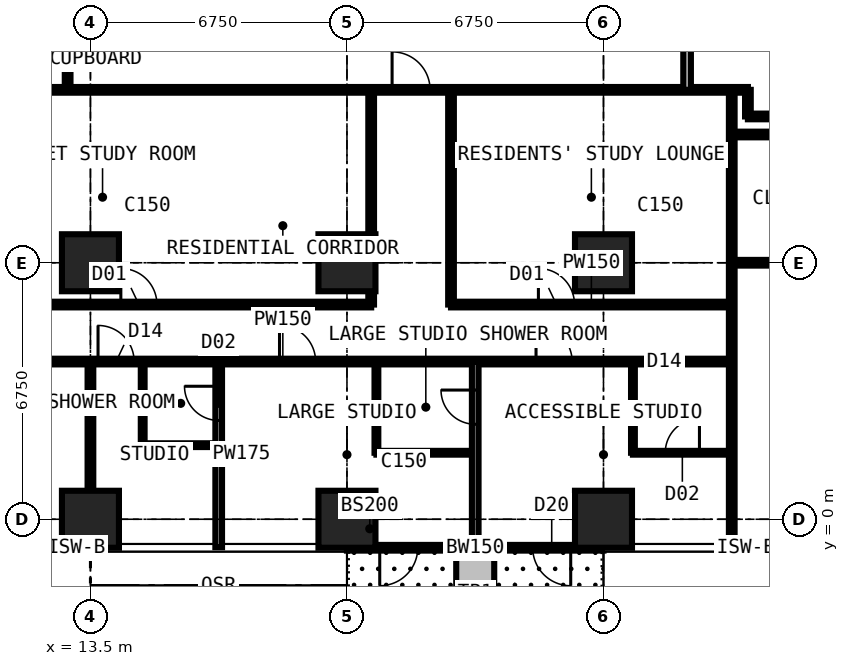
"""IFC4 building model, lengths in metres.
Left out: names, types, materials, properties, quantities, classifications, styles, units other than length and angle.
Written with IfcOpenShell. Run it as: python <this file> out.ifc"""

import sys

from ifc_helpers import new_model, si_unit, direction, frame, frame_2d, origin, origin_2d, place, context, subcontext, project, spatial, rectangle, extrude, element, fill, save


model = new_model("IFC4")
c1 = context("Model", 3, precision=1e-05, world=origin(), true_north=direction((0.0, 1.0)))
c2 = subcontext(c1, "Body", "Model", "MODEL_VIEW")
j1 = project(units=[si_unit("LENGTHUNIT", "METRE"), si_unit("PLANEANGLEUNIT", "RADIAN")], contexts=[c1])
p1 = place(None, origin())
s1 = spatial("IfcSite", under=j1, at=p1, CompositionType="ELEMENT")
p2 = place(p1, origin())
s2 = spatial("IfcBuilding", under=s1, at=p2, CompositionType="ELEMENT")
p3 = place(p2, frame((0.0, 0.0, 126.9)))
s3 = spatial("IfcBuildingStorey", under=s2, at=p3, CompositionType="ELEMENT", Elevation=126.9)
for number, where, z_axis, x_axis in (
    (1, (13.5, 0.0, 0.0), (0.0, 0.0, 1.0), (1.0, 0.0, 0.0)),
    (2, (13.5, 6.75, 0.0), (0.0, 0.0, 1.0), (1.0, 0.0, 0.0)),
    (3, (20.25, 0.0, 0.0), (0.0, 0.0, 1.0), (1.0, 0.0, 0.0)),
    (4, (20.25, 6.75, 0.0), (0.0, 0.0, 1.0), (1.0, 0.0, 0.0)),
    (5, (27.0, 0.0, 0.0), (0.0, 0.0, 1.0), (1.0, 0.0, 0.0)),
    (6, (27.0, 6.75, 0.0), (0.0, 0.0, 1.0), (1.0, 0.0, 0.0)),
):
    element("IfcColumn", number, at=place(p3, frame(where, z_axis=z_axis, x_axis=x_axis)), inside=s3, PredefinedType="COLUMN", context=c2, shape_type="SweptSolid", body=[
        extrude(rectangle(XDim=1.5, YDim=1.5, at=origin_2d()), origin(), (0.0, 0.0, 1.0), 3.6),
    ])
p4 = place(p3, frame((27.0, -0.75, 0.0), z_axis=(0.0, 0.0, 1.0), x_axis=(-1.0, 0.0, 0.0)))
e7 = element("IfcWall", 7, at=p4, inside=s3, PredefinedType="SOLIDWALL", context=c2, shape_type="SweptSolid", body=[
    extrude(rectangle(XDim=6.75, YDim=0.15, at=frame_2d((3.375, 0.0))), origin(), (0.0, 0.0, 1.0), 3.375),
])
p5 = place(p4, frame((0.863, 0.0, 0.0)))
e8 = element("IfcOpeningElement", 8, at=p5, cuts=e7, PredefinedType="OPENING", context=c2, shape_type="SweptSolid", body=[
    extrude(rectangle(XDim=1.0, YDim=2.2, at=frame_2d((0.5, 1.1))), frame((0.0, 0.085, 0.0), z_axis=(0.0, -1.0, 0.0), x_axis=(1.0, 0.0, 0.0)), (0.0, 0.0, 1.0), 0.17),
])
p6 = place(p4, frame((1.975, 0.0, 0.9)))
e9 = element("IfcOpeningElement", 9, at=p6, cuts=e7, PredefinedType="OPENING", context=c2, shape_type="SweptSolid", body=[
    extrude(rectangle(XDim=1.2, YDim=1.8, at=frame_2d((0.6, 0.9))), frame((0.0, 0.085, 0.0), z_axis=(0.0, -1.0, 0.0), x_axis=(1.0, 0.0, 0.0)), (0.0, 0.0, 1.0), 0.17),
])
p7 = place(p4, frame((4.887, 0.0, 0.0)))
e10 = element("IfcOpeningElement", 10, at=p7, cuts=e7, PredefinedType="OPENING", context=c2, shape_type="SweptSolid", body=[
    extrude(rectangle(XDim=1.0, YDim=2.2, at=frame_2d((0.5, 1.1))), frame((0.0, 0.085, 0.0), z_axis=(0.0, -1.0, 0.0), x_axis=(1.0, 0.0, 0.0)), (0.0, 0.0, 1.0), 0.17),
])
p8 = place(p4, frame((3.575, 0.0, 0.9)))
e11 = element("IfcOpeningElement", 11, at=p8, cuts=e7, PredefinedType="OPENING", context=c2, shape_type="SweptSolid", body=[
    extrude(rectangle(XDim=1.2, YDim=1.8, at=frame_2d((0.6, 0.9))), frame((0.0, 0.085, 0.0), z_axis=(0.0, -1.0, 0.0), x_axis=(1.0, 0.0, 0.0)), (0.0, 0.0, 1.0), 0.17),
])
p9 = place(p3, frame((23.625, -0.85, 0.0), z_axis=(0.0, 0.0, 1.0), x_axis=(0.0, -1.0, 0.0)))
e12 = element("IfcWall", 12, at=p9, inside=s3, PredefinedType="USERDEFINED", context=c2, shape_type="SweptSolid", body=[
    extrude(rectangle(XDim=2.2, YDim=1.0, at=frame_2d((1.1, 0.0))), origin(), (0.0, 0.0, 1.0), 0.9),
])
p10 = place(p3, frame((6.75, 4.15, 0.0), z_axis=(0.0, 0.0, 1.0), x_axis=(1.0, 0.0, 0.0)))
e13 = element("IfcWall", 13, at=p10, inside=s3, PredefinedType="PARTITIONING", context=c2, shape_type="SweptSolid", body=[
    extrude(rectangle(XDim=23.625, YDim=0.15, at=frame_2d((11.812, 0.0))), origin(), (0.0, 0.0, 1.0), 3.375),
])
p11 = place(p10, frame((2.85, 0.0, 0.0)))
e14 = element("IfcOpeningElement", 14, at=p11, cuts=e13, PredefinedType="OPENING", context=c2, shape_type="SweptSolid", body=[
    extrude(rectangle(XDim=1.0, YDim=2.2, at=frame_2d((0.5, 1.1))), frame((0.0, 0.085, 0.0), z_axis=(0.0, -1.0, 0.0), x_axis=(1.0, 0.0, 0.0)), (0.0, 0.0, 1.0), 0.17),
])
p12 = place(p10, frame((18.475, 0.0, 0.0)))
e15 = element("IfcOpeningElement", 15, at=p12, cuts=e13, PredefinedType="OPENING", context=c2, shape_type="SweptSolid", body=[
    extrude(rectangle(XDim=0.95, YDim=2.2, at=frame_2d((0.475, 1.1))), frame((0.0, 0.085, 0.0), z_axis=(0.0, -1.0, 0.0), x_axis=(1.0, 0.0, 0.0)), (0.0, 0.0, 1.0), 0.17),
])
p13 = place(p10, frame((11.725, 0.0, 0.0)))
e16 = element("IfcOpeningElement", 16, at=p13, cuts=e13, PredefinedType="OPENING", context=c2, shape_type="SweptSolid", body=[
    extrude(rectangle(XDim=0.95, YDim=2.2, at=frame_2d((0.475, 1.1))), frame((0.0, 0.085, 0.0), z_axis=(0.0, -1.0, 0.0), x_axis=(1.0, 0.0, 0.0)), (0.0, 0.0, 1.0), 0.17),
])
p14 = place(p10, frame((6.95, 0.0, 0.0)))
e17 = element("IfcOpeningElement", 17, at=p14, cuts=e13, PredefinedType="OPENING", context=c2, shape_type="SweptSolid", body=[
    extrude(rectangle(XDim=0.95, YDim=2.2, at=frame_2d((0.475, 1.1))), frame((0.0, 0.085, 0.0), z_axis=(0.0, -1.0, 0.0), x_axis=(1.0, 0.0, 0.0)), (0.0, 0.0, 1.0), 0.17),
])
p15 = place(p3, frame((6.75, 5.65, 0.0), z_axis=(0.0, 0.0, 1.0), x_axis=(1.0, 0.0, 0.0)))
e18 = element("IfcWall", 18, at=p15, inside=s3, PredefinedType="PARTITIONING", context=c2, shape_type="SweptSolid", body=[
    extrude(rectangle(XDim=14.137, YDim=0.15, at=frame_2d((7.069, 0.0))), origin(), (0.0, 0.0, 1.0), 3.375),
])
p16 = place(p15, frame((7.55, 0.0, 0.0)))
e19 = element("IfcOpeningElement", 19, at=p16, cuts=e18, PredefinedType="OPENING", context=c2, shape_type="SweptSolid", body=[
    extrude(rectangle(XDim=0.95, YDim=2.2, at=frame_2d((0.475, 1.1))), frame((0.0, 0.085, 0.0), z_axis=(0.0, -1.0, 0.0), x_axis=(1.0, 0.0, 0.0)), (0.0, 0.0, 1.0), 0.17),
])
p17 = place(p3, frame((10.125, 11.3, 0.0), z_axis=(0.0, 0.0, 1.0), x_axis=(1.0, 0.0, 0.0)))
e20 = element("IfcWall", 20, at=p17, inside=s3, PredefinedType="PARTITIONING", context=c2, shape_type="SweptSolid", body=[
    extrude(rectangle(XDim=20.675, YDim=0.15, at=frame_2d((10.337, 0.0))), origin(), (0.0, 0.0, 1.0), 3.375),
])
p18 = place(p17, frame((11.312, 0.0, 0.0)))
e21 = element("IfcOpeningElement", 21, at=p18, cuts=e20, PredefinedType="OPENING", context=c2, shape_type="SweptSolid", body=[
    extrude(rectangle(XDim=1.0, YDim=2.2, at=frame_2d((0.5, 1.1))), frame((0.0, 0.085, 0.0), z_axis=(0.0, -1.0, 0.0), x_axis=(1.0, 0.0, 0.0)), (0.0, 0.0, 1.0), 0.17),
])
p19 = place(p3, frame((12.9, 11.3, 0.0), z_axis=(0.0, 0.0, 1.0), x_axis=(0.0, 1.0, 0.0)))
e22 = element("IfcWall", 22, at=p19, inside=s3, PredefinedType="PARTITIONING", context=c2, shape_type="SweptSolid", body=[
    extrude(rectangle(XDim=1.6, YDim=0.15, at=frame_2d((0.8, 0.0))), origin(), (0.0, 0.0, 1.0), 3.375),
])
p20 = place(p3, frame((13.5, -0.734, 0.0), z_axis=(0.0, 0.0, 1.0), x_axis=(0.0, 1.0, 0.0)))
e23 = element("IfcWall", 23, at=p20, inside=s3, PredefinedType="PARTITIONING", context=c2, shape_type="SweptSolid", body=[
    extrude(rectangle(XDim=4.884, YDim=0.15, at=frame_2d((2.442, 0.0))), origin(), (0.0, 0.0, 1.0), 2.61),
])
p21 = place(p3, frame((14.875, 1.95, 0.0), z_axis=(0.0, 0.0, 1.0), x_axis=(0.0, 1.0, 0.0)))
e24 = element("IfcWall", 24, at=p21, inside=s3, PredefinedType="PARTITIONING", context=c2, shape_type="SweptSolid", body=[
    extrude(rectangle(XDim=2.2, YDim=0.1, at=frame_2d((1.1, 0.0))), origin(), (0.0, 0.0, 1.0), 3.375),
])
p22 = place(p3, frame((14.875, 1.95, 0.0), z_axis=(0.0, 0.0, 1.0), x_axis=(1.0, 0.0, 0.0)))
e25 = element("IfcWall", 25, at=p22, inside=s3, PredefinedType="PARTITIONING", context=c2, shape_type="SweptSolid", body=[
    extrude(rectangle(XDim=2.0, YDim=0.1, at=frame_2d((1.0, 0.0))), origin(), (0.0, 0.0, 1.0), 3.375),
])
p23 = place(p3, frame((16.875, -0.734, 0.0), z_axis=(0.0, 0.0, 1.0), x_axis=(0.0, 1.0, 0.0)))
e26 = element("IfcWall", 26, at=p23, inside=s3, PredefinedType="PARTITIONING", context=c2, shape_type="SweptSolid", body=[
    extrude(rectangle(XDim=4.884, YDim=0.175, at=frame_2d((2.442, 0.0))), origin(), (0.0, 0.0, 1.0), 3.375),
])
p24 = place(p23, frame((3.334, 0.0, 0.0)))
e27 = element("IfcOpeningElement", 27, at=p24, cuts=e26, PredefinedType="OPENING", context=c2, shape_type="SweptSolid", body=[
    extrude(rectangle(XDim=0.9, YDim=2.2, at=frame_2d((0.45, 1.1))), frame((0.0, 0.097, 0.0), z_axis=(0.0, -1.0, 0.0), x_axis=(1.0, 0.0, 0.0)), (0.0, 0.0, 1.0), 0.195),
])
p25 = place(p3, frame((20.887, 5.65, 0.0), z_axis=(0.0, 0.0, 1.0), x_axis=(0.0, 1.0, 0.0)))
e28 = element("IfcWall", 28, at=p25, inside=s3, PredefinedType="PARTITIONING", context=c2, shape_type="SweptSolid", body=[
    extrude(rectangle(XDim=5.65, YDim=0.15, at=frame_2d((2.825, 0.0))), origin(), (0.0, 0.0, 1.0), 3.375),
])
p26 = place(p3, frame((21.025, 1.75, 0.0), z_axis=(0.0, 0.0, 1.0), x_axis=(0.0, 1.0, 0.0)))
e29 = element("IfcWall", 29, at=p26, inside=s3, PredefinedType="PARTITIONING", context=c2, shape_type="SweptSolid", body=[
    extrude(rectangle(XDim=2.4, YDim=0.1, at=frame_2d((1.2, 0.0))), origin(), (0.0, 0.0, 1.0), 3.375),
])
p27 = place(p3, frame((21.025, 1.75, 0.0), z_axis=(0.0, 0.0, 1.0), x_axis=(1.0, 0.0, 0.0)))
e30 = element("IfcWall", 30, at=p27, inside=s3, PredefinedType="PARTITIONING", context=c2, shape_type="SweptSolid", body=[
    extrude(rectangle(XDim=2.6, YDim=0.1, at=frame_2d((1.3, 0.0))), origin(), (0.0, 0.0, 1.0), 3.375),
])
p28 = place(p3, frame((22.988, 5.65, 0.0), z_axis=(0.0, 0.0, 1.0), x_axis=(1.0, 0.0, 0.0)))
e31 = element("IfcWall", 31, at=p28, inside=s3, PredefinedType="PARTITIONING", context=c2, shape_type="SweptSolid", body=[
    extrude(rectangle(XDim=7.387, YDim=0.15, at=frame_2d((3.694, 0.0))), origin(), (0.0, 0.0, 1.0), 3.375),
])
p29 = place(p28, frame((2.3, 0.0, 0.0)))
e32 = element("IfcOpeningElement", 32, at=p29, cuts=e31, PredefinedType="OPENING", context=c2, shape_type="SweptSolid", body=[
    extrude(rectangle(XDim=0.95, YDim=2.2, at=frame_2d((0.475, 1.1))), frame((0.0, 0.085, 0.0), z_axis=(0.0, -1.0, 0.0), x_axis=(1.0, 0.0, 0.0)), (0.0, 0.0, 1.0), 0.17),
])
p30 = place(p3, frame((22.988, 5.65, 0.0), z_axis=(0.0, 0.0, 1.0), x_axis=(0.0, 1.0, 0.0)))
e33 = element("IfcWall", 33, at=p30, inside=s3, PredefinedType="PARTITIONING", context=c2, shape_type="SweptSolid", body=[
    extrude(rectangle(XDim=5.65, YDim=0.15, at=frame_2d((2.825, 0.0))), origin(), (0.0, 0.0, 1.0), 3.375),
])
p31 = place(p3, frame((23.625, -0.734, 0.0), z_axis=(0.0, 0.0, 1.0), x_axis=(0.0, 1.0, 0.0)))
e34 = element("IfcWall", 34, at=p31, inside=s3, PredefinedType="PARTITIONING", context=c2, shape_type="SweptSolid", body=[
    extrude(rectangle(XDim=4.884, YDim=0.175, at=frame_2d((2.442, 0.0))), origin(), (0.0, 0.0, 1.0), 3.375),
])
p32 = place(p31, frame((3.234, 0.0, 0.0)))
e35 = element("IfcOpeningElement", 35, at=p32, cuts=e34, PredefinedType="OPENING", context=c2, shape_type="SweptSolid", body=[
    extrude(rectangle(XDim=0.9, YDim=2.2, at=frame_2d((0.45, 1.1))), frame((0.0, 0.097, 0.0), z_axis=(0.0, -1.0, 0.0), x_axis=(1.0, 0.0, 0.0)), (0.0, 0.0, 1.0), 0.195),
])
p33 = place(p3, frame((27.775, 1.75, 0.0), z_axis=(0.0, 0.0, 1.0), x_axis=(0.0, 1.0, 0.0)))
e36 = element("IfcWall", 36, at=p33, inside=s3, PredefinedType="PARTITIONING", context=c2, shape_type="SweptSolid", body=[
    extrude(rectangle(XDim=2.4, YDim=0.1, at=frame_2d((1.2, 0.0))), origin(), (0.0, 0.0, 1.0), 3.375),
])
p34 = place(p3, frame((27.775, 1.75, 0.0), z_axis=(0.0, 0.0, 1.0), x_axis=(1.0, 0.0, 0.0)))
e37 = element("IfcWall", 37, at=p34, inside=s3, PredefinedType="PARTITIONING", context=c2, shape_type="SweptSolid", body=[
    extrude(rectangle(XDim=2.6, YDim=0.1, at=frame_2d((1.3, 0.0))), origin(), (0.0, 0.0, 1.0), 3.375),
])
p35 = place(p34, frame((0.85, 0.0, 0.0)))
e38 = element("IfcOpeningElement", 38, at=p35, cuts=e37, PredefinedType="OPENING", context=c2, shape_type="SweptSolid", body=[
    extrude(rectangle(XDim=0.9, YDim=2.2, at=frame_2d((0.45, 1.1))), frame((0.0, 0.06, 0.0), z_axis=(0.0, -1.0, 0.0), x_axis=(1.0, 0.0, 0.0)), (0.0, 0.0, 1.0), 0.12),
])
p36 = place(p3, frame((29.2, 11.3, 0.0), z_axis=(0.0, 0.0, 1.0), x_axis=(0.0, 1.0, 0.0)))
e39 = element("IfcWall", 39, at=p36, inside=s3, PredefinedType="PARTITIONING", context=c2, shape_type="SweptSolid", body=[
    extrude(rectangle(XDim=17.9, YDim=0.2, at=frame_2d((8.95, 0.0))), origin(), (0.0, 0.0, 1.0), 3.375),
])
p37 = place(p36, frame((8.35, 0.0, 0.0)))
e40 = element("IfcOpeningElement", 40, at=p37, cuts=e39, PredefinedType="OPENING", context=c2, shape_type="SweptSolid", body=[
    extrude(rectangle(XDim=1.2, YDim=2.2, at=frame_2d((0.6, 1.1))), frame((0.0, 0.11, 0.0), z_axis=(0.0, -1.0, 0.0), x_axis=(1.0, 0.0, 0.0)), (0.0, 0.0, 1.0), 0.22),
])
p38 = place(p3, frame((30.375, -0.734, 0.0), z_axis=(0.0, 0.0, 1.0), x_axis=(0.0, 1.0, 0.0)))
e41 = element("IfcWall", 41, at=p38, inside=s3, PredefinedType="PARTITIONING", context=c2, shape_type="SweptSolid", body=[
    extrude(rectangle(XDim=12.034, YDim=0.15, at=frame_2d((6.017, 0.0))), origin(), (0.0, 0.0, 1.0), 3.375),
])
p39 = place(p3, frame((30.375, 6.75, 0.0), z_axis=(0.0, 0.0, 1.0), x_axis=(1.0, 0.0, 0.0)))
e42 = element("IfcWall", 42, at=p39, inside=s3, PredefinedType="PARTITIONING", context=c2, shape_type="SweptSolid", body=[
    extrude(rectangle(XDim=10.859, YDim=0.15, at=frame_2d((5.429, 0.0))), origin(), (0.0, 0.0, 1.0), 2.877),
])
p40 = place(p39, frame((1.6, 0.0, 0.0)))
e43 = element("IfcOpeningElement", 43, at=p40, cuts=e42, PredefinedType="OPENING", context=c2, shape_type="SweptSolid", body=[
    extrude(rectangle(XDim=1.0, YDim=2.2, at=frame_2d((0.5, 1.1))), frame((0.0, 0.085, 0.0), z_axis=(0.0, -1.0, 0.0), x_axis=(1.0, 0.0, 0.0)), (0.0, 0.0, 1.0), 0.17),
])
p41 = place(p3, frame((30.375, 10.125, 0.0), z_axis=(0.0, 0.0, 1.0), x_axis=(1.0, 0.0, 0.0)))
e44 = element("IfcWall", 44, at=p41, inside=s3, PredefinedType="PARTITIONING", context=c2, shape_type="SweptSolid", body=[
    extrude(rectangle(XDim=10.859, YDim=0.15, at=frame_2d((5.429, 0.0))), origin(), (0.0, 0.0, 1.0), 3.375),
])
p42 = place(p41, frame((2.5, 0.0, 0.0)))
e45 = element("IfcOpeningElement", 45, at=p42, cuts=e44, PredefinedType="OPENING", context=c2, shape_type="SweptSolid", body=[
    extrude(rectangle(XDim=1.0, YDim=2.2, at=frame_2d((0.5, 1.1))), frame((0.0, 0.085, 0.0), z_axis=(0.0, -1.0, 0.0), x_axis=(1.0, 0.0, 0.0)), (0.0, 0.0, 1.0), 0.17),
])
p43 = place(p3, frame((30.8, 10.6, 0.0), z_axis=(0.0, 0.0, 1.0), x_axis=(0.0, 1.0, 0.0)))
e46 = element("IfcWall", 46, at=p43, inside=s3, PredefinedType="PARTITIONING", context=c2, shape_type="SweptSolid", body=[
    extrude(rectangle(XDim=0.7, YDim=0.15, at=frame_2d((0.35, 0.0))), origin(), (0.0, 0.0, 1.0), 3.375),
])
p44 = place(p3, frame((30.8, 10.6, 0.0), z_axis=(0.0, 0.0, 1.0), x_axis=(1.0, 0.0, 0.0)))
e47 = element("IfcWall", 47, at=p44, inside=s3, PredefinedType="PARTITIONING", context=c2, shape_type="SweptSolid", body=[
    extrude(rectangle(XDim=1.85, YDim=0.15, at=frame_2d((0.925, 0.0))), origin(), (0.0, 0.0, 1.0), 3.375),
])
p45 = place(p5, origin())
e48 = element("IfcDoor", 48, at=p45, inside=s3, OperationType="SINGLE_SWING_LEFT", PredefinedType="DOOR", context=c2, shape_type="SweptSolid", body=[
    extrude(rectangle(XDim=1.0, YDim=2.2, at=frame_2d((0.5, 1.1))), frame((0.0, 0.025, 0.0), z_axis=(0.0, -1.0, 0.0), x_axis=(1.0, 0.0, 0.0)), (0.0, 0.0, 1.0), 0.05),
])
fill(e8, e48)
p46 = place(p6, origin())
e49 = element("IfcWindow", 49, at=p46, inside=s3, PartitioningType="SINGLE_PANEL", PredefinedType="WINDOW", context=c2, shape_type="SweptSolid", body=[
    extrude(rectangle(XDim=1.2, YDim=1.8, at=frame_2d((0.6, 0.9))), frame((0.0, 0.03, 0.0), z_axis=(0.0, -1.0, 0.0), x_axis=(1.0, 0.0, 0.0)), (0.0, 0.0, 1.0), 0.06),
])
fill(e9, e49)
p47 = place(p7, origin())
e50 = element("IfcDoor", 50, at=p47, inside=s3, OperationType="SINGLE_SWING_RIGHT", PredefinedType="DOOR", context=c2, shape_type="SweptSolid", body=[
    extrude(rectangle(XDim=1.0, YDim=2.2, at=frame_2d((0.5, 1.1))), frame((0.0, 0.025, 0.0), z_axis=(0.0, -1.0, 0.0), x_axis=(1.0, 0.0, 0.0)), (0.0, 0.0, 1.0), 0.05),
])
fill(e10, e50)
p48 = place(p8, origin())
e51 = element("IfcWindow", 51, at=p48, inside=s3, PartitioningType="SINGLE_PANEL", PredefinedType="WINDOW", context=c2, shape_type="SweptSolid", body=[
    extrude(rectangle(XDim=1.2, YDim=1.8, at=frame_2d((0.6, 0.9))), frame((0.0, 0.03, 0.0), z_axis=(0.0, -1.0, 0.0), x_axis=(1.0, 0.0, 0.0)), (0.0, 0.0, 1.0), 0.06),
])
fill(e11, e51)
p49 = place(p12, origin())
e52 = element("IfcDoor", 52, at=p49, inside=s3, OperationType="SINGLE_SWING_LEFT", PredefinedType="DOOR", context=c2, shape_type="SweptSolid", body=[
    extrude(rectangle(XDim=0.95, YDim=2.2, at=frame_2d((0.475, 1.1))), frame((0.0, 0.025, 0.0), z_axis=(0.0, -1.0, 0.0), x_axis=(1.0, 0.0, 0.0)), (0.0, 0.0, 1.0), 0.05),
])
fill(e15, e52)
p50 = place(p35, origin())
e53 = element("IfcDoor", 53, at=p50, inside=s3, OperationType="SINGLE_SWING_RIGHT", PredefinedType="DOOR", context=c2, shape_type="SweptSolid", body=[
    extrude(rectangle(XDim=0.9, YDim=2.2, at=frame_2d((0.45, 1.1))), frame((0.0, 0.025, 0.0), z_axis=(0.0, -1.0, 0.0), x_axis=(1.0, 0.0, 0.0)), (0.0, 0.0, 1.0), 0.05),
])
fill(e38, e53)
p51 = place(p13, origin())
e54 = element("IfcDoor", 54, at=p51, inside=s3, OperationType="SINGLE_SWING_LEFT", PredefinedType="DOOR", context=c2, shape_type="SweptSolid", body=[
    extrude(rectangle(XDim=0.95, YDim=2.2, at=frame_2d((0.475, 1.1))), frame((0.0, 0.025, 0.0), z_axis=(0.0, -1.0, 0.0), x_axis=(1.0, 0.0, 0.0)), (0.0, 0.0, 1.0), 0.05),
])
fill(e16, e54)
p52 = place(p32, origin())
e55 = element("IfcDoor", 55, at=p52, inside=s3, OperationType="SINGLE_SWING_RIGHT", PredefinedType="DOOR", context=c2, shape_type="SweptSolid", body=[
    extrude(rectangle(XDim=0.9, YDim=2.2, at=frame_2d((0.45, 1.1))), frame((0.0, 0.025, 0.0), z_axis=(0.0, -1.0, 0.0), x_axis=(1.0, 0.0, 0.0)), (0.0, 0.0, 1.0), 0.05),
])
fill(e35, e55)
p53 = place(p14, origin())
e56 = element("IfcDoor", 56, at=p53, inside=s3, OperationType="SINGLE_SWING_LEFT", PredefinedType="DOOR", context=c2, shape_type="SweptSolid", body=[
    extrude(rectangle(XDim=0.95, YDim=2.2, at=frame_2d((0.475, 1.1))), frame((0.0, 0.025, 0.0), z_axis=(0.0, -1.0, 0.0), x_axis=(1.0, 0.0, 0.0)), (0.0, 0.0, 1.0), 0.05),
])
fill(e17, e56)
p54 = place(p24, origin())
e57 = element("IfcDoor", 57, at=p54, inside=s3, OperationType="SINGLE_SWING_RIGHT", PredefinedType="DOOR", context=c2, shape_type="SweptSolid", body=[
    extrude(rectangle(XDim=0.9, YDim=2.2, at=frame_2d((0.45, 1.1))), frame((0.0, 0.025, 0.0), z_axis=(0.0, -1.0, 0.0), x_axis=(1.0, 0.0, 0.0)), (0.0, 0.0, 1.0), 0.05),
])
fill(e27, e57)
p55 = place(p18, origin())
e58 = element("IfcDoor", 58, at=p55, inside=s3, OperationType="SINGLE_SWING_LEFT", PredefinedType="DOOR", context=c2, shape_type="SweptSolid", body=[
    extrude(rectangle(XDim=1.0, YDim=2.2, at=frame_2d((0.5, 1.1))), frame((0.0, 0.025, 0.0), z_axis=(0.0, -1.0, 0.0), x_axis=(1.0, 0.0, 0.0)), (0.0, 0.0, 1.0), 0.05),
])
fill(e21, e58)
p56 = place(p29, origin())
e59 = element("IfcDoor", 59, at=p56, inside=s3, OperationType="SINGLE_SWING_LEFT", PredefinedType="DOOR", context=c2, shape_type="SweptSolid", body=[
    extrude(rectangle(XDim=0.95, YDim=2.2, at=frame_2d((0.475, 1.1))), frame((0.0, 0.025, 0.0), z_axis=(0.0, -1.0, 0.0), x_axis=(1.0, 0.0, 0.0)), (0.0, 0.0, 1.0), 0.05),
])
fill(e32, e59)
p57 = place(p16, origin())
e60 = element("IfcDoor", 60, at=p57, inside=s3, OperationType="SINGLE_SWING_LEFT", PredefinedType="DOOR", context=c2, shape_type="SweptSolid", body=[
    extrude(rectangle(XDim=0.95, YDim=2.2, at=frame_2d((0.475, 1.1))), frame((0.0, 0.025, 0.0), z_axis=(0.0, -1.0, 0.0), x_axis=(1.0, 0.0, 0.0)), (0.0, 0.0, 1.0), 0.05),
])
fill(e19, e60)
save(model, sys.argv[1])
